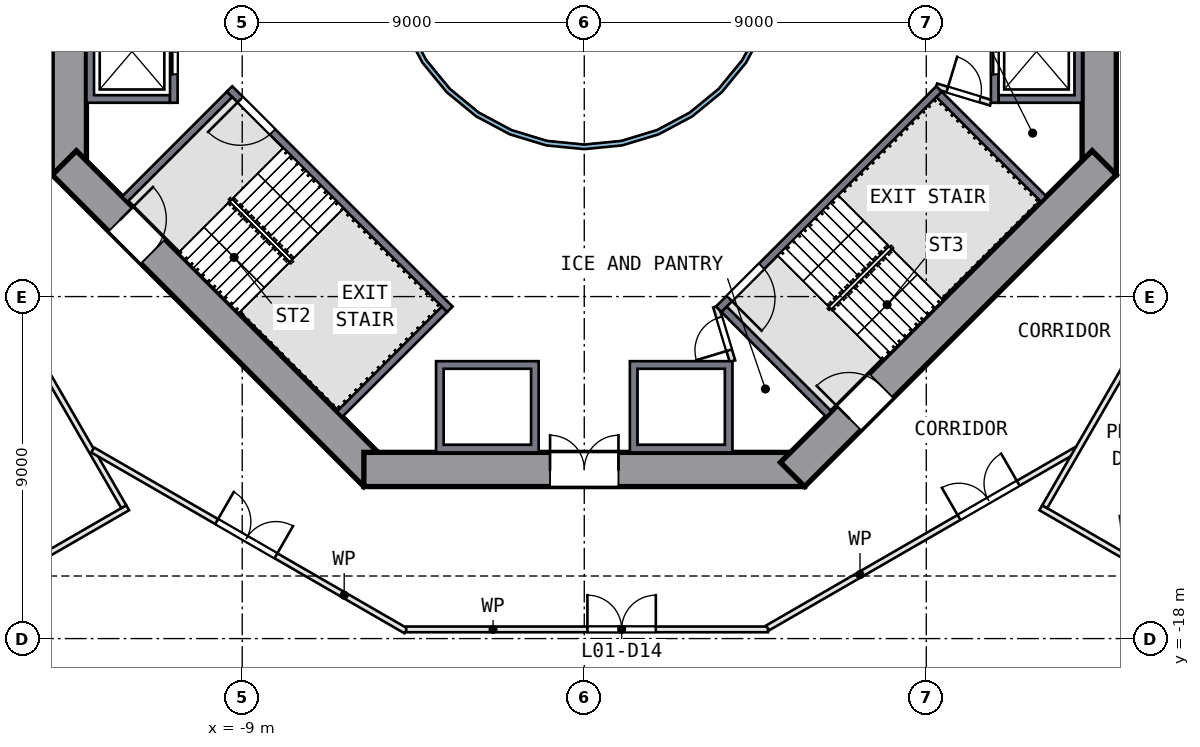
"""IFC4 building model, lengths in metres.
Left out: names, types, materials, properties, quantities, classifications, styles, units other than length and angle.
Written with IfcOpenShell. Run it as: python <this file> out.ifc"""

import sys

from ifc_helpers import new_model, si_unit, direction, frame, frame_2d, origin, place, context, subcontext, project, spatial, polyline, rectangle, outline, extrude, element, fill, save


model = new_model("IFC4")
c1 = context("Model", 3, precision=1e-05, world=origin(), true_north=direction((0.0, 1.0)))
c2 = subcontext(c1, "Body", "Model", "MODEL_VIEW")
j1 = project(units=[si_unit("LENGTHUNIT", "METRE"), si_unit("PLANEANGLEUNIT", "RADIAN")], contexts=[c1])
p1 = place(None, origin())
s1 = spatial("IfcSite", under=j1, at=p1, CompositionType="ELEMENT")
p2 = place(p1, origin())
s2 = spatial("IfcBuilding", under=s1, at=p2, CompositionType="ELEMENT")
p3 = place(p2, frame((0.0, 0.0, 8.0)))
s3 = spatial("IfcBuildingStorey", under=s2, at=p3, CompositionType="ELEMENT", Elevation=8.0)
p4 = place(p3, frame((13.55, -5.799, 0.0), z_axis=(0.0, 0.0, 1.0), x_axis=(0.0, 1.0, 0.0)))
e1 = element("IfcWall", 1, at=p4, inside=s3, PredefinedType="SHEAR", context=c2, shape_type="SweptSolid", body=[
    extrude(rectangle(XDim=11.598, YDim=0.9, at=frame_2d((5.799, 0.0))), origin(), (0.0, 0.0, 1.0), 6.0),
])
p5 = place(p4, frame((4.899, 0.0, 0.0)))
e2 = element("IfcOpeningElement", 2, at=p5, cuts=e1, PredefinedType="OPENING", context=c2, shape_type="SweptSolid", body=[
    extrude(rectangle(XDim=1.8, YDim=2.1, at=frame_2d((0.9, 1.05))), frame((0.0, 0.46, 0.0), z_axis=(0.0, -1.0, 0.0), x_axis=(1.0, 0.0, 0.0)), (0.0, 0.0, 1.0), 0.92),
])
p6 = place(p3, frame((-13.55, 5.799, 0.0), z_axis=(0.0, 0.0, 1.0), x_axis=(0.0, -1.0, 0.0)))
e3 = element("IfcWall", 3, at=p6, inside=s3, PredefinedType="SHEAR", context=c2, shape_type="SweptSolid", body=[
    extrude(rectangle(XDim=11.598, YDim=0.9, at=frame_2d((5.799, 0.0))), origin(), (0.0, 0.0, 1.0), 6.0),
])
p7 = place(p6, frame((4.899, 0.0, 0.0)))
e4 = element("IfcOpeningElement", 4, at=p7, cuts=e3, PredefinedType="OPENING", context=c2, shape_type="SweptSolid", body=[
    extrude(rectangle(XDim=1.8, YDim=2.1, at=frame_2d((0.9, 1.05))), frame((0.0, 0.46, 0.0), z_axis=(0.0, -1.0, 0.0), x_axis=(1.0, 0.0, 0.0)), (0.0, 0.0, 1.0), 0.92),
])
p8 = place(p3, frame((-13.682, -5.481, 0.0), z_axis=(0.0, 0.0, 1.0), x_axis=(0.707106781, -0.707106781, 0.0)))
e5 = element("IfcWall", 5, at=p8, inside=s3, PredefinedType="SHEAR", context=c2, shape_type="SweptSolid", body=[
    extrude(rectangle(XDim=11.598, YDim=0.9, at=frame_2d((5.799, 0.0))), origin(), (0.0, 0.0, 1.0), 6.0),
])
p9 = place(p8, frame((2.099, 0.0, 0.0)))
e6 = element("IfcOpeningElement", 6, at=p9, cuts=e5, PredefinedType="OPENING", context=c2, shape_type="SweptSolid", body=[
    extrude(rectangle(XDim=1.2, YDim=2.1, at=frame_2d((0.6, 1.05))), frame((0.0, 0.46, 0.0), z_axis=(0.0, -1.0, 0.0), x_axis=(1.0, 0.0, 0.0)), (0.0, 0.0, 1.0), 0.92),
])
p10 = place(p3, frame((-5.799, -13.55, 0.0), z_axis=(0.0, 0.0, 1.0), x_axis=(1.0, 0.0, 0.0)))
e7 = element("IfcWall", 7, at=p10, inside=s3, PredefinedType="SHEAR", context=c2, shape_type="SweptSolid", body=[
    extrude(rectangle(XDim=11.598, YDim=0.9, at=frame_2d((5.799, 0.0))), origin(), (0.0, 0.0, 1.0), 6.0),
])
p11 = place(p10, frame((4.899, 0.0, 0.0)))
e8 = element("IfcOpeningElement", 8, at=p11, cuts=e7, PredefinedType="OPENING", context=c2, shape_type="SweptSolid", body=[
    extrude(rectangle(XDim=1.8, YDim=2.1, at=frame_2d((0.9, 1.05))), frame((0.0, 0.46, 0.0), z_axis=(0.0, -1.0, 0.0), x_axis=(1.0, 0.0, 0.0)), (0.0, 0.0, 1.0), 0.92),
])
p12 = place(p3, frame((5.481, -13.682, 0.0), z_axis=(0.0, 0.0, 1.0), x_axis=(0.707106781, 0.707106781, 0.0)))
e9 = element("IfcWall", 9, at=p12, inside=s3, PredefinedType="SHEAR", context=c2, shape_type="SweptSolid", body=[
    extrude(rectangle(XDim=11.598, YDim=0.9, at=frame_2d((5.799, 0.0))), origin(), (0.0, 0.0, 1.0), 6.0),
])
p13 = place(p12, frame((2.099, 0.0, 0.0)))
e10 = element("IfcOpeningElement", 10, at=p13, cuts=e9, PredefinedType="OPENING", context=c2, shape_type="SweptSolid", body=[
    extrude(rectangle(XDim=1.2, YDim=2.1, at=frame_2d((0.6, 1.05))), frame((0.0, 0.46, 0.0), z_axis=(0.0, -1.0, 0.0), x_axis=(1.0, 0.0, 0.0)), (0.0, 0.0, 1.0), 0.92),
])
p14 = place(p3, frame((-17.828, -17.637, 0.0), z_axis=(0.0, 0.0, 1.0), x_axis=(0.866029009, -0.499993756, 0.0)))
e11 = element("IfcWall", 11, at=p14, inside=s3, PredefinedType="SOLIDWALL", context=c2, shape_type="SweptSolid", body=[
    extrude(rectangle(XDim=13.242, YDim=0.14, at=frame_2d((6.621, 0.0))), origin(), (0.0, 0.0, 1.0), 5.55),
])
p15 = place(p14, frame((1.46, 0.0, 0.9)))
e12 = element("IfcOpeningElement", 12, at=p15, cuts=e11, PredefinedType="OPENING", context=c2, shape_type="SweptSolid", body=[
    extrude(rectangle(XDim=3.6, YDim=3.6, at=frame_2d((1.8, 1.8))), frame((0.0, 0.08, 0.0), z_axis=(0.0, -1.0, 0.0), x_axis=(1.0, 0.0, 0.0)), (0.0, 0.0, 1.0), 0.16),
])
p16 = place(p14, frame((8.215, 0.0, 0.9)))
e13 = element("IfcOpeningElement", 13, at=p16, cuts=e11, PredefinedType="OPENING", context=c2, shape_type="SweptSolid", body=[
    extrude(rectangle(XDim=3.0, YDim=3.6, at=frame_2d((1.5, 1.8))), frame((0.0, 0.08, 0.0), z_axis=(0.0, -1.0, 0.0), x_axis=(1.0, 0.0, 0.0)), (0.0, 0.0, 1.0), 0.16),
])
p17 = place(p3, origin())
e14 = element("IfcWall", 14, at=p17, inside=s3, PredefinedType="SOLIDWALL", context=c2, shape_type="SweptSolid", body=[
    extrude(outline(polyline([(13.1, -3.9), (10.9, -3.9), (10.9, -3.7), (12.9, -3.7), (12.9, -1.4), (10.9, -1.4), (10.9, -1.2), (13.1, -1.2), (13.1, -3.9)])), origin(), (0.0, 0.0, 1.0), 5.55),
])
p18 = place(p3, frame((10.8, -1.2, 0.0), z_axis=(0.0, 0.0, 1.0), x_axis=(0.0, -1.0, 0.0)))
e15 = element("IfcWall", 15, at=p18, inside=s3, PredefinedType="SOLIDWALL", context=c2, shape_type="SweptSolid", body=[
    extrude(rectangle(XDim=2.7, YDim=0.2, at=frame_2d((1.35, 0.0))), origin(), (0.0, 0.0, 1.0), 5.55),
])
p19 = place(p18, frame((0.75, 0.0, 0.0)))
e16 = element("IfcOpeningElement", 16, at=p19, cuts=e15, PredefinedType="OPENING", context=c2, shape_type="SweptSolid", body=[
    extrude(rectangle(XDim=1.2, YDim=2.1, at=frame_2d((0.6, 1.05))), frame((0.0, 0.11, 0.0), z_axis=(0.0, -1.0, 0.0), x_axis=(1.0, 0.0, 0.0)), (0.0, 0.0, 1.0), 0.22),
])
p20 = place(p3, origin())
e17 = element("IfcWall", 17, at=p20, inside=s3, PredefinedType="SOLIDWALL", context=c2, shape_type="SweptSolid", body=[
    extrude(outline(polyline([(-13.1, -3.9), (-13.1, -1.2), (-10.9, -1.2), (-10.9, -1.4), (-12.9, -1.4), (-12.9, -3.7), (-10.9, -3.7), (-10.9, -3.9), (-13.1, -3.9)])), origin(), (0.0, 0.0, 1.0), 5.55),
])
p21 = place(p3, frame((-10.8, -1.2, 0.0), z_axis=(0.0, 0.0, 1.0), x_axis=(0.0, -1.0, 0.0)))
e18 = element("IfcWall", 18, at=p21, inside=s3, PredefinedType="SOLIDWALL", context=c2, shape_type="SweptSolid", body=[
    extrude(rectangle(XDim=2.7, YDim=0.2, at=frame_2d((1.35, 0.0))), origin(), (0.0, 0.0, 1.0), 5.55),
])
p22 = place(p21, frame((0.75, 0.0, 0.0)))
e19 = element("IfcOpeningElement", 19, at=p22, cuts=e18, PredefinedType="OPENING", context=c2, shape_type="SweptSolid", body=[
    extrude(rectangle(XDim=1.2, YDim=2.1, at=frame_2d((0.6, 1.05))), frame((0.0, 0.11, 0.0), z_axis=(0.0, -1.0, 0.0), x_axis=(1.0, 0.0, 0.0)), (0.0, 0.0, 1.0), 0.22),
])
p23 = place(p3, origin())
e20 = element("IfcWall", 20, at=p23, inside=s3, PredefinedType="SOLIDWALL", context=c2, shape_type="SweptSolid", body=[
    extrude(outline(polyline([(-1.2, -13.1), (-3.9, -13.1), (-3.9, -10.7), (-1.2, -10.7), (-1.2, -13.1)]), holes=[polyline([(-3.7, -10.9), (-3.7, -12.9), (-1.4, -12.9), (-1.4, -10.9), (-3.7, -10.9)])]), origin(), (0.0, 0.0, 1.0), 5.55),
])
p24 = place(p3, origin())
e21 = element("IfcWall", 21, at=p24, inside=s3, PredefinedType="SOLIDWALL", context=c2, shape_type="SweptSolid", body=[
    extrude(outline(polyline([(3.9, -10.7), (3.9, -13.1), (1.2, -13.1), (1.2, -10.7), (3.9, -10.7)]), holes=[polyline([(1.4, -12.9), (3.7, -12.9), (3.7, -10.9), (1.4, -10.9), (1.4, -12.9)])]), origin(), (0.0, 0.0, 1.0), 5.55),
])
p25 = place(p3, frame((-3.535, -9.334, 0.0), z_axis=(0.0, 0.0, 1.0), x_axis=(-0.707106781, 0.707106781, 0.0)))
e22 = element("IfcWall", 22, at=p25, inside=s3, PredefinedType="SOLIDWALL", context=c2, shape_type="SweptSolid", body=[
    extrude(rectangle(XDim=8.2, YDim=0.2, at=frame_2d((4.1, 0.0))), origin(), (0.0, 0.0, 1.0), 5.55),
])
p26 = place(p25, frame((6.6, 0.0, 0.0)))
e23 = element("IfcOpeningElement", 23, at=p26, cuts=e22, PredefinedType="OPENING", context=c2, shape_type="SweptSolid", body=[
    extrude(rectangle(XDim=1.2, YDim=2.1, at=frame_2d((0.6, 1.05))), frame((0.0, 0.11, 0.0), z_axis=(0.0, -1.0, 0.0), x_axis=(1.0, 0.0, 0.0)), (0.0, 0.0, 1.0), 0.22),
])
for number, where, z_axis, x_axis in (
    (24, (-9.334, -3.677, 0.0), (0.0, 0.0, 1.0), (-0.707, -0.707, 0.0)),
    (25, (-3.677, -9.334, 0.0), (0.0, 0.0, 1.0), (-0.707, -0.707, 0.0)),
):
    element("IfcWall", number, at=place(p3, frame(where, z_axis=z_axis, x_axis=x_axis)), inside=s3, PredefinedType="SOLIDWALL", context=c2, shape_type="SweptSolid", body=[
        extrude(rectangle(XDim=3.9, YDim=0.2, at=frame_2d((1.95, 0.0))), origin(), (0.0, 0.0, 1.0), 5.55),
    ])
p27 = place(p3, frame((9.334, -3.535, 0.0), z_axis=(0.0, 0.0, 1.0), x_axis=(-0.707106781, -0.707106781, 0.0)))
e26 = element("IfcWall", 26, at=p27, inside=s3, PredefinedType="SOLIDWALL", context=c2, shape_type="SweptSolid", body=[
    extrude(rectangle(XDim=8.2, YDim=0.2, at=frame_2d((4.1, 0.0))), origin(), (0.0, 0.0, 1.0), 5.55),
])
p28 = place(p27, frame((6.6, 0.0, 0.0)))
e27 = element("IfcOpeningElement", 27, at=p28, cuts=e26, PredefinedType="OPENING", context=c2, shape_type="SweptSolid", body=[
    extrude(rectangle(XDim=1.2, YDim=2.1, at=frame_2d((0.6, 1.05))), frame((0.0, 0.11, 0.0), z_axis=(0.0, -1.0, 0.0), x_axis=(1.0, 0.0, 0.0)), (0.0, 0.0, 1.0), 0.22),
])
for number, where, z_axis, x_axis in (
    (28, (3.677, -9.334, 0.0), (0.0, 0.0, 1.0), (0.707, -0.707, 0.0)),
    (29, (9.334, -3.677, 0.0), (0.0, 0.0, 1.0), (0.707, -0.707, 0.0)),
):
    element("IfcWall", number, at=place(p3, frame(where, z_axis=z_axis, x_axis=x_axis)), inside=s3, PredefinedType="SOLIDWALL", context=c2, shape_type="SweptSolid", body=[
        extrude(rectangle(XDim=3.9, YDim=0.2, at=frame_2d((1.95, 0.0))), origin(), (0.0, 0.0, 1.0), 5.55),
    ])
p29 = place(p3, frame((3.9, -10.7, 0.0), z_axis=(0.0, 0.0, 1.0), x_axis=(-0.289808785, 0.957084567, 0.0)))
e30 = element("IfcWall", 30, at=p29, inside=s3, PredefinedType="PARTITIONING", context=c2, shape_type="SweptSolid", body=[
    extrude(rectangle(XDim=1.501, YDim=0.15, at=frame_2d((0.75, 0.0))), origin(), (0.0, 0.0, 1.0), 5.55),
])
p30 = place(p29, frame((0.301, 0.0, 0.0)))
e31 = element("IfcOpeningElement", 31, at=p30, cuts=e30, PredefinedType="OPENING", context=c2, shape_type="SweptSolid", body=[
    extrude(rectangle(XDim=0.9, YDim=2.1, at=frame_2d((0.45, 1.05))), frame((0.0, 0.085, 0.0), z_axis=(0.0, -1.0, 0.0), x_axis=(1.0, 0.0, 0.0)), (0.0, 0.0, 1.0), 0.17),
])
p31 = place(p3, frame((9.263, -3.465, 0.0), z_axis=(0.0, 0.0, 1.0), x_axis=(0.957084567, -0.289808785, 0.0)))
e32 = element("IfcWall", 32, at=p31, inside=s3, PredefinedType="PARTITIONING", context=c2, shape_type="SweptSolid", body=[
    extrude(rectangle(XDim=1.501, YDim=0.15, at=frame_2d((0.75, 0.0))), origin(), (0.0, 0.0, 1.0), 5.55),
])
p32 = place(p31, frame((0.301, 0.0, 0.0)))
e33 = element("IfcOpeningElement", 33, at=p32, cuts=e32, PredefinedType="OPENING", context=c2, shape_type="SweptSolid", body=[
    extrude(rectangle(XDim=0.9, YDim=2.1, at=frame_2d((0.45, 1.05))), frame((0.0, 0.085, 0.0), z_axis=(0.0, -1.0, 0.0), x_axis=(1.0, 0.0, 0.0)), (0.0, 0.0, 1.0), 0.17),
])
p33 = place(p3, origin())
e34 = element("IfcWall", 34, at=p33, inside=s3, PredefinedType="SOLIDWALL", context=c2, shape_type="SweptSolid", body=[
    extrude(outline(polyline([(5.021, -0.999), (4.73, -1.959), (4.257, -2.844), (3.62, -3.62), (2.844, -4.257), (1.959, -4.73), (0.999, -5.021), (0.0, -5.12), (-0.999, -5.021), (-1.959, -4.73), (-2.844, -4.257), (-3.62, -3.62), (-4.257, -2.844), (-4.73, -1.959), (-5.021, -0.999), (-5.12, 0.0), (-5.021, 0.999), (-4.73, 1.959), (-4.257, 2.844), (-3.62, 3.62), (-2.844, 4.257), (-1.959, 4.73), (-0.999, 5.021), (0.0, 5.12), (0.999, 5.021), (1.959, 4.73), (2.844, 4.257), (3.62, 3.62), (4.257, 2.844), (4.73, 1.959), (5.021, 0.999), (5.12, 0.0), (5.021, -0.999)]), holes=[polyline([(4.904, 0.976), (4.619, 1.913), (4.157, 2.778), (3.535, 3.535), (2.778, 4.157), (1.913, 4.619), (0.976, 4.904), (0.0, 5.0), (-0.976, 4.904), (-1.913, 4.619), (-2.778, 4.157), (-3.535, 3.535), (-4.157, 2.778), (-4.619, 1.913), (-4.904, 0.976), (-5.0, 0.0), (-4.904, -0.976), (-4.619, -1.913), (-4.157, -2.778), (-3.535, -3.535), (-2.778, -4.157), (-1.913, -4.619), (-0.976, -4.904), (0.0, -5.0), (0.976, -4.904), (1.913, -4.619), (2.778, -4.157), (3.535, -3.535), (4.157, -2.778), (4.619, -1.913), (4.904, -0.976), (5.0, 0.0), (4.904, 0.976)])]), origin(), (0.0, 0.0, 1.0), 5.55),
])
p34 = place(p3, frame((-16.978, -17.424, 0.0), z_axis=(0.0, 0.0, 1.0), x_axis=(0.866011812, 0.500023541, 0.0)))
e35 = element("IfcWall", 35, at=p34, inside=s3, PredefinedType="PARTITIONING", context=c2, shape_type="SweptSolid", body=[
    extrude(rectangle(XDim=5.732, YDim=0.15, at=frame_2d((2.866, 0.0))), origin(), (0.0, 0.0, 1.0), 5.55),
])
p35 = place(p3, frame((-18.642, -3.229, 0.0), z_axis=(0.0, 0.0, 1.0), x_axis=(0.499998298, -0.866026387, 0.0)))
e36 = element("IfcWall", 36, at=p35, inside=s3, PredefinedType="PARTITIONING", context=c2, shape_type="SweptSolid", body=[
    extrude(rectangle(XDim=13.05, YDim=0.15, at=frame_2d((6.525, 0.0))), origin(), (0.0, 0.0, 1.0), 5.55),
])
p36 = place(p35, frame((5.7, 0.0, 0.0)))
e37 = element("IfcOpeningElement", 37, at=p36, cuts=e36, PredefinedType="OPENING", context=c2, shape_type="SweptSolid", body=[
    extrude(rectangle(XDim=1.8, YDim=2.1, at=frame_2d((0.9, 1.05))), frame((0.0, 0.085, 0.0), z_axis=(0.0, -1.0, 0.0), x_axis=(1.0, 0.0, 0.0)), (0.0, 0.0, 1.0), 0.17),
])
p37 = place(p3, frame((-12.935, -13.038, 0.0), z_axis=(0.0, 0.0, 1.0), x_axis=(0.866027519, -0.499996337, 0.0)))
e38 = element("IfcWall", 38, at=p37, inside=s3, PredefinedType="PARTITIONING", context=c2, shape_type="SweptSolid", body=[
    extrude(rectangle(XDim=9.517, YDim=0.15, at=frame_2d((4.758, 0.0))), origin(), (0.0, 0.0, 1.0), 5.55),
])
p38 = place(p37, frame((3.767, 0.0, 0.0)))
e39 = element("IfcOpeningElement", 39, at=p38, cuts=e38, PredefinedType="OPENING", context=c2, shape_type="SweptSolid", body=[
    extrude(rectangle(XDim=1.8, YDim=2.1, at=frame_2d((0.9, 1.05))), frame((0.0, 0.085, 0.0), z_axis=(0.0, -1.0, 0.0), x_axis=(1.0, 0.0, 0.0)), (0.0, 0.0, 1.0), 0.17),
])
p39 = place(p3, frame((-4.683, -17.758, 0.0), z_axis=(0.0, 0.0, 1.0), x_axis=(1.0, 0.0, 0.0)))
e40 = element("IfcWall", 40, at=p39, inside=s3, PredefinedType="PARTITIONING", context=c2, shape_type="SweptSolid", body=[
    extrude(rectangle(XDim=9.517, YDim=0.15, at=frame_2d((4.758, 0.0))), origin(), (0.0, 0.0, 1.0), 5.55),
])
p40 = place(p39, frame((4.767, 0.0, 0.0)))
e41 = element("IfcOpeningElement", 41, at=p40, cuts=e40, PredefinedType="OPENING", context=c2, shape_type="SweptSolid", body=[
    extrude(rectangle(XDim=1.8, YDim=2.1, at=frame_2d((0.9, 1.05))), frame((0.0, 0.085, 0.0), z_axis=(0.0, -1.0, 0.0), x_axis=(1.0, 0.0, 0.0)), (0.0, 0.0, 1.0), 0.17),
])
p41 = place(p3, frame((12.014, -14.557, 0.0), z_axis=(0.0, 0.0, 1.0), x_axis=(0.866014594, -0.500018723, 0.0)))
e42 = element("IfcWall", 42, at=p41, inside=s3, PredefinedType="PARTITIONING", context=c2, shape_type="SweptSolid", body=[
    extrude(rectangle(XDim=5.421, YDim=0.15, at=frame_2d((2.71, 0.0))), origin(), (0.0, 0.0, 1.0), 5.55),
])
p42 = place(p3, frame((4.823, -17.721, 0.0), z_axis=(0.0, 0.0, 1.0), x_axis=(0.866037142, 0.499979668, 0.0)))
e43 = element("IfcWall", 43, at=p42, inside=s3, PredefinedType="PARTITIONING", context=c2, shape_type="SweptSolid", body=[
    extrude(rectangle(XDim=9.367, YDim=0.15, at=frame_2d((4.683, 0.0))), origin(), (0.0, 0.0, 1.0), 5.55),
])
p43 = place(p42, frame((5.817, 0.0, 0.0)))
e44 = element("IfcOpeningElement", 44, at=p43, cuts=e43, PredefinedType="OPENING", context=c2, shape_type="SweptSolid", body=[
    extrude(rectangle(XDim=1.8, YDim=2.1, at=frame_2d((0.9, 1.05))), frame((0.0, 0.085, 0.0), z_axis=(0.0, -1.0, 0.0), x_axis=(1.0, 0.0, 0.0)), (0.0, 0.0, 1.0), 0.17),
])
p44 = place(p3, frame((14.804, -9.875, 0.0), z_axis=(0.0, 0.0, 1.0), x_axis=(-0.4999885, -0.866032043, 0.0)))
e45 = element("IfcWall", 45, at=p44, inside=s3, PredefinedType="PARTITIONING", context=c2, shape_type="SweptSolid", body=[
    extrude(rectangle(XDim=5.375, YDim=0.15, at=frame_2d((2.688, 0.0))), origin(), (0.0, 0.0, 1.0), 5.55),
])
p45 = place(p15, origin())
e46 = element("IfcWindow", 46, at=p45, inside=s3, PartitioningType="SINGLE_PANEL", PredefinedType="WINDOW", context=c2, shape_type="SweptSolid", body=[
    extrude(rectangle(XDim=3.6, YDim=3.6, at=frame_2d((1.8, 1.8))), frame((0.0, 0.03, 0.0), z_axis=(0.0, -1.0, 0.0), x_axis=(1.0, 0.0, 0.0)), (0.0, 0.0, 1.0), 0.06),
])
fill(e12, e46)
p46 = place(p19, origin())
e47 = element("IfcDoor", 47, at=p46, inside=s3, OperationType="DOUBLE_DOOR_SLIDING", PredefinedType="DOOR", context=c2, shape_type="SweptSolid", body=[
    extrude(rectangle(XDim=1.2, YDim=2.1, at=frame_2d((0.6, 1.05))), frame((0.0, 0.025, 0.0), z_axis=(0.0, -1.0, 0.0), x_axis=(1.0, 0.0, 0.0)), (0.0, 0.0, 1.0), 0.05),
])
fill(e16, e47)
p47 = place(p22, origin())
e48 = element("IfcDoor", 48, at=p47, inside=s3, OperationType="DOUBLE_DOOR_SLIDING", PredefinedType="DOOR", context=c2, shape_type="SweptSolid", body=[
    extrude(rectangle(XDim=1.2, YDim=2.1, at=frame_2d((0.6, 1.05))), frame((0.0, 0.025, 0.0), z_axis=(0.0, -1.0, 0.0), x_axis=(1.0, 0.0, 0.0)), (0.0, 0.0, 1.0), 0.05),
])
fill(e19, e48)
p48 = place(p26, origin())
e49 = element("IfcDoor", 49, at=p48, inside=s3, OperationType="SINGLE_SWING_RIGHT", PredefinedType="DOOR", context=c2, shape_type="SweptSolid", body=[
    extrude(rectangle(XDim=1.2, YDim=2.1, at=frame_2d((0.6, 1.05))), frame((0.0, 0.025, 0.0), z_axis=(0.0, -1.0, 0.0), x_axis=(1.0, 0.0, 0.0)), (0.0, 0.0, 1.0), 0.05),
])
fill(e23, e49)
p49 = place(p28, origin())
e50 = element("IfcDoor", 50, at=p49, inside=s3, OperationType="SINGLE_SWING_RIGHT", PredefinedType="DOOR", context=c2, shape_type="SweptSolid", body=[
    extrude(rectangle(XDim=1.2, YDim=2.1, at=frame_2d((0.6, 1.05))), frame((0.0, 0.025, 0.0), z_axis=(0.0, -1.0, 0.0), x_axis=(1.0, 0.0, 0.0)), (0.0, 0.0, 1.0), 0.05),
])
fill(e27, e50)
p50 = place(p11, origin())
e51 = element("IfcDoor", 51, at=p50, inside=s3, OperationType="DOUBLE_DOOR_SINGLE_SWING", PredefinedType="DOOR", context=c2, shape_type="SweptSolid", body=[
    extrude(rectangle(XDim=1.8, YDim=2.1, at=frame_2d((0.9, 1.05))), frame((0.0, 0.025, 0.0), z_axis=(0.0, -1.0, 0.0), x_axis=(1.0, 0.0, 0.0)), (0.0, 0.0, 1.0), 0.05),
])
fill(e8, e51)
p51 = place(p9, origin())
e52 = element("IfcDoor", 52, at=p51, inside=s3, OperationType="SINGLE_SWING_LEFT", PredefinedType="DOOR", context=c2, shape_type="SweptSolid", body=[
    extrude(rectangle(XDim=1.2, YDim=2.1, at=frame_2d((0.6, 1.05))), frame((0.0, 0.025, 0.0), z_axis=(0.0, -1.0, 0.0), x_axis=(1.0, 0.0, 0.0)), (0.0, 0.0, 1.0), 0.05),
])
fill(e6, e52)
p52 = place(p13, origin())
e53 = element("IfcDoor", 53, at=p52, inside=s3, OperationType="SINGLE_SWING_LEFT", PredefinedType="DOOR", context=c2, shape_type="SweptSolid", body=[
    extrude(rectangle(XDim=1.2, YDim=2.1, at=frame_2d((0.6, 1.05))), frame((0.0, 0.025, 0.0), z_axis=(0.0, -1.0, 0.0), x_axis=(1.0, 0.0, 0.0)), (0.0, 0.0, 1.0), 0.05),
])
fill(e10, e53)
p53 = place(p30, origin())
e54 = element("IfcDoor", 54, at=p53, inside=s3, OperationType="SINGLE_SWING_LEFT", PredefinedType="DOOR", context=c2, shape_type="SweptSolid", body=[
    extrude(rectangle(XDim=0.9, YDim=2.1, at=frame_2d((0.45, 1.05))), frame((0.0, 0.025, 0.0), z_axis=(0.0, -1.0, 0.0), x_axis=(1.0, 0.0, 0.0)), (0.0, 0.0, 1.0), 0.05),
])
fill(e31, e54)
p54 = place(p32, origin())
e55 = element("IfcDoor", 55, at=p54, inside=s3, OperationType="SINGLE_SWING_LEFT", PredefinedType="DOOR", context=c2, shape_type="SweptSolid", body=[
    extrude(rectangle(XDim=0.9, YDim=2.1, at=frame_2d((0.45, 1.05))), frame((0.0, 0.025, 0.0), z_axis=(0.0, -1.0, 0.0), x_axis=(1.0, 0.0, 0.0)), (0.0, 0.0, 1.0), 0.05),
])
fill(e33, e55)
p55 = place(p38, origin())
e56 = element("IfcDoor", 56, at=p55, inside=s3, OperationType="DOUBLE_DOOR_SINGLE_SWING", PredefinedType="DOOR", context=c2, shape_type="SweptSolid", body=[
    extrude(rectangle(XDim=1.8, YDim=2.1, at=frame_2d((0.9, 1.05))), frame((0.0, 0.025, 0.0), z_axis=(0.0, -1.0, 0.0), x_axis=(1.0, 0.0, 0.0)), (0.0, 0.0, 1.0), 0.05),
])
fill(e39, e56)
p56 = place(p40, origin())
e57 = element("IfcDoor", 57, at=p56, inside=s3, OperationType="DOUBLE_DOOR_SINGLE_SWING", PredefinedType="DOOR", context=c2, shape_type="SweptSolid", body=[
    extrude(rectangle(XDim=1.8, YDim=2.1, at=frame_2d((0.9, 1.05))), frame((0.0, 0.025, 0.0), z_axis=(0.0, -1.0, 0.0), x_axis=(1.0, 0.0, 0.0)), (0.0, 0.0, 1.0), 0.05),
])
fill(e41, e57)
p57 = place(p43, origin())
e58 = element("IfcDoor", 58, at=p57, inside=s3, OperationType="DOUBLE_DOOR_SINGLE_SWING", PredefinedType="DOOR", context=c2, shape_type="SweptSolid", body=[
    extrude(rectangle(XDim=1.8, YDim=2.1, at=frame_2d((0.9, 1.05))), frame((0.0, 0.025, 0.0), z_axis=(0.0, -1.0, 0.0), x_axis=(1.0, 0.0, 0.0)), (0.0, 0.0, 1.0), 0.05),
])
fill(e44, e58)
save(model, sys.argv[1])
